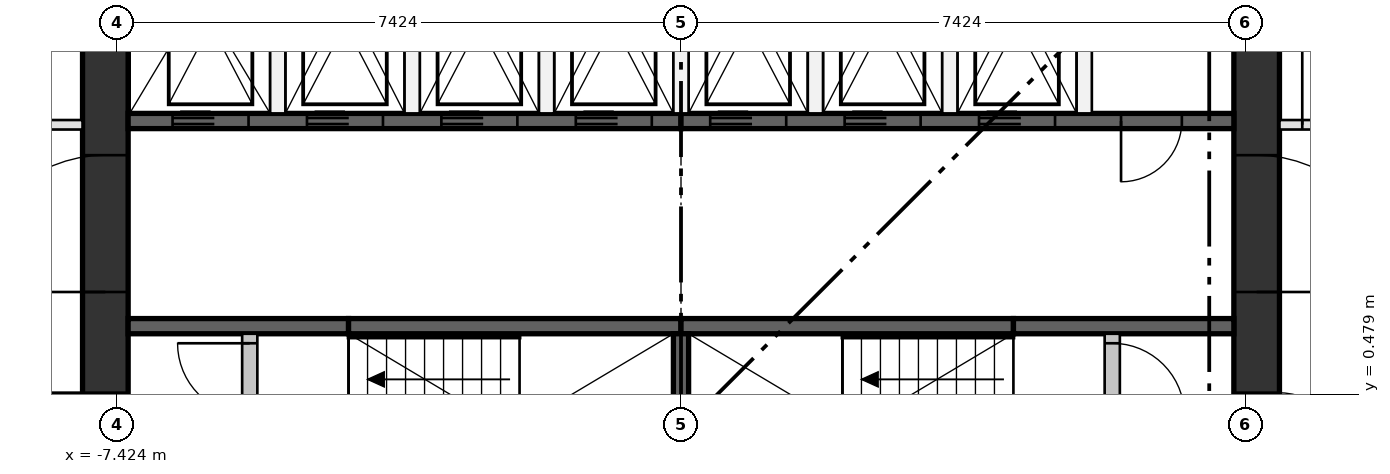
"""IFC4 building model, lengths in metres.
Left out: names, types, materials, properties, quantities, classifications, styles, units other than length and angle.
Written with IfcOpenShell. Run it as: python <this file> out.ifc"""

import sys

from ifc_helpers import new_model, si_unit, direction, frame, frame_2d, origin, place, context, subcontext, project, spatial, rectangle, extrude, element, fill, save


model = new_model("IFC4")
c1 = context("Model", 3, precision=1e-05, world=origin(), true_north=direction((0.0, 1.0)))
c2 = subcontext(c1, "Body", "Model", "MODEL_VIEW")
j1 = project(units=[si_unit("LENGTHUNIT", "METRE"), si_unit("PLANEANGLEUNIT", "RADIAN")], contexts=[c1])
p1 = place(None, origin())
s1 = spatial("IfcSite", under=j1, at=p1, CompositionType="ELEMENT")
p2 = place(p1, origin())
s2 = spatial("IfcBuilding", under=s1, at=p2, CompositionType="ELEMENT")
p3 = place(p2, frame((0.0, 0.0, 144.4)))
s3 = spatial("IfcBuildingStorey", under=s2, at=p3, CompositionType="ELEMENT", Elevation=144.4)
p4 = place(p3, frame((-7.574, -7.274, 0.0), z_axis=(0.0, 0.0, 1.0), x_axis=(0.0, 1.0, 0.0)))
e1 = element("IfcWall", 1, at=p4, inside=s3, PredefinedType="SHEAR", context=c2, shape_type="SweptSolid", body=[
    extrude(rectangle(XDim=14.548, YDim=0.6, at=frame_2d((7.274, 0.0))), origin(), (0.0, 0.0, 1.0), 3.35),
])
p5 = place(p4, frame((6.774, 0.0, 0.0)))
e2 = element("IfcOpeningElement", 2, at=p5, cuts=e1, PredefinedType="OPENING", context=c2, shape_type="SweptSolid", body=[
    extrude(rectangle(XDim=1.0, YDim=2.1, at=frame_2d((0.5, 1.05))), frame((0.0, 0.31, 0.0), z_axis=(0.0, -1.0, 0.0), x_axis=(1.0, 0.0, 0.0)), (0.0, 0.0, 1.0), 0.62),
])
p6 = place(p4, frame((3.649, 0.0, 0.0)))
e3 = element("IfcOpeningElement", 3, at=p6, cuts=e1, PredefinedType="OPENING", context=c2, shape_type="SweptSolid", body=[
    extrude(rectangle(XDim=1.8, YDim=2.1, at=frame_2d((0.9, 1.05))), frame((0.0, 0.31, 0.0), z_axis=(0.0, -1.0, 0.0), x_axis=(1.0, 0.0, 0.0)), (0.0, 0.0, 1.0), 0.62),
])
p7 = place(p4, frame((9.098, 0.0, 0.0)))
e4 = element("IfcOpeningElement", 4, at=p7, cuts=e1, PredefinedType="OPENING", context=c2, shape_type="SweptSolid", body=[
    extrude(rectangle(XDim=1.8, YDim=2.1, at=frame_2d((0.9, 1.05))), frame((0.0, 0.31, 0.0), z_axis=(0.0, -1.0, 0.0), x_axis=(1.0, 0.0, 0.0)), (0.0, 0.0, 1.0), 0.62),
])
p8 = place(p3, frame((7.574, -7.274, 0.0), z_axis=(0.0, 0.0, 1.0), x_axis=(0.0, 1.0, 0.0)))
e5 = element("IfcWall", 5, at=p8, inside=s3, PredefinedType="SHEAR", context=c2, shape_type="SweptSolid", body=[
    extrude(rectangle(XDim=14.548, YDim=0.6, at=frame_2d((7.274, 0.0))), origin(), (0.0, 0.0, 1.0), 3.35),
])
p9 = place(p8, frame((6.774, 0.0, 0.0)))
e6 = element("IfcOpeningElement", 6, at=p9, cuts=e5, PredefinedType="OPENING", context=c2, shape_type="SweptSolid", body=[
    extrude(rectangle(XDim=1.0, YDim=2.1, at=frame_2d((0.5, 1.05))), frame((0.0, 0.31, 0.0), z_axis=(0.0, -1.0, 0.0), x_axis=(1.0, 0.0, 0.0)), (0.0, 0.0, 1.0), 0.62),
])
p10 = place(p8, frame((3.649, 0.0, 0.0)))
e7 = element("IfcOpeningElement", 7, at=p10, cuts=e5, PredefinedType="OPENING", context=c2, shape_type="SweptSolid", body=[
    extrude(rectangle(XDim=1.8, YDim=2.1, at=frame_2d((0.9, 1.05))), frame((0.0, 0.31, 0.0), z_axis=(0.0, -1.0, 0.0), x_axis=(1.0, 0.0, 0.0)), (0.0, 0.0, 1.0), 0.62),
])
p11 = place(p8, frame((9.098, 0.0, 0.0)))
e8 = element("IfcOpeningElement", 8, at=p11, cuts=e5, PredefinedType="OPENING", context=c2, shape_type="SweptSolid", body=[
    extrude(rectangle(XDim=1.8, YDim=2.1, at=frame_2d((0.9, 1.05))), frame((0.0, 0.31, 0.0), z_axis=(0.0, -1.0, 0.0), x_axis=(1.0, 0.0, 0.0)), (0.0, 0.0, 1.0), 0.62),
])
p12 = place(p3, frame((-7.274, 4.074, 0.0), z_axis=(0.0, 0.0, 1.0), x_axis=(1.0, 0.0, 0.0)))
e9 = element("IfcWall", 9, at=p12, inside=s3, PredefinedType="SHEAR", context=c2, shape_type="SweptSolid", body=[
    extrude(rectangle(XDim=7.274, YDim=0.2, at=frame_2d((3.637, 0.0))), origin(), (0.0, 0.0, 1.0), 3.0),
])
p13 = place(p12, frame((0.584, 0.0, 0.0)))
e10 = element("IfcOpeningElement", 10, at=p13, cuts=e9, PredefinedType="OPENING", context=c2, shape_type="SweptSolid", body=[
    extrude(rectangle(XDim=1.0, YDim=2.1, at=frame_2d((0.5, 1.05))), frame((0.0, 0.11, 0.0), z_axis=(0.0, -1.0, 0.0), x_axis=(1.0, 0.0, 0.0)), (0.0, 0.0, 1.0), 0.22),
])
p14 = place(p12, frame((2.353, 0.0, 0.0)))
e11 = element("IfcOpeningElement", 11, at=p14, cuts=e9, PredefinedType="OPENING", context=c2, shape_type="SweptSolid", body=[
    extrude(rectangle(XDim=1.0, YDim=2.1, at=frame_2d((0.5, 1.05))), frame((0.0, 0.11, 0.0), z_axis=(0.0, -1.0, 0.0), x_axis=(1.0, 0.0, 0.0)), (0.0, 0.0, 1.0), 0.22),
])
p15 = place(p12, frame((4.121, 0.0, 0.0)))
e12 = element("IfcOpeningElement", 12, at=p15, cuts=e9, PredefinedType="OPENING", context=c2, shape_type="SweptSolid", body=[
    extrude(rectangle(XDim=1.0, YDim=2.1, at=frame_2d((0.5, 1.05))), frame((0.0, 0.11, 0.0), z_axis=(0.0, -1.0, 0.0), x_axis=(1.0, 0.0, 0.0)), (0.0, 0.0, 1.0), 0.22),
])
p16 = place(p12, frame((5.89, 0.0, 0.0)))
e13 = element("IfcOpeningElement", 13, at=p16, cuts=e9, PredefinedType="OPENING", context=c2, shape_type="SweptSolid", body=[
    extrude(rectangle(XDim=1.0, YDim=2.1, at=frame_2d((0.5, 1.05))), frame((0.0, 0.11, 0.0), z_axis=(0.0, -1.0, 0.0), x_axis=(1.0, 0.0, 0.0)), (0.0, 0.0, 1.0), 0.22),
])
p17 = place(p3, frame((0.0, 4.074, 0.0), z_axis=(0.0, 0.0, 1.0), x_axis=(1.0, 0.0, 0.0)))
e14 = element("IfcWall", 14, at=p17, inside=s3, PredefinedType="SHEAR", context=c2, shape_type="SweptSolid", body=[
    extrude(rectangle(XDim=7.274, YDim=0.2, at=frame_2d((3.637, 0.0))), origin(), (0.0, 0.0, 1.0), 3.0),
])
p18 = place(p17, frame((0.384, 0.0, 0.0)))
e15 = element("IfcOpeningElement", 15, at=p18, cuts=e14, PredefinedType="OPENING", context=c2, shape_type="SweptSolid", body=[
    extrude(rectangle(XDim=1.0, YDim=2.1, at=frame_2d((0.5, 1.05))), frame((0.0, 0.11, 0.0), z_axis=(0.0, -1.0, 0.0), x_axis=(1.0, 0.0, 0.0)), (0.0, 0.0, 1.0), 0.22),
])
p19 = place(p17, frame((2.153, 0.0, 0.0)))
e16 = element("IfcOpeningElement", 16, at=p19, cuts=e14, PredefinedType="OPENING", context=c2, shape_type="SweptSolid", body=[
    extrude(rectangle(XDim=1.0, YDim=2.1, at=frame_2d((0.5, 1.05))), frame((0.0, 0.11, 0.0), z_axis=(0.0, -1.0, 0.0), x_axis=(1.0, 0.0, 0.0)), (0.0, 0.0, 1.0), 0.22),
])
p20 = place(p17, frame((3.921, 0.0, 0.0)))
e17 = element("IfcOpeningElement", 17, at=p20, cuts=e14, PredefinedType="OPENING", context=c2, shape_type="SweptSolid", body=[
    extrude(rectangle(XDim=1.0, YDim=2.1, at=frame_2d((0.5, 1.05))), frame((0.0, 0.11, 0.0), z_axis=(0.0, -1.0, 0.0), x_axis=(1.0, 0.0, 0.0)), (0.0, 0.0, 1.0), 0.22),
])
p21 = place(p17, frame((5.79, 0.0, 0.0)))
e18 = element("IfcOpeningElement", 18, at=p21, cuts=e14, PredefinedType="OPENING", context=c2, shape_type="SweptSolid", body=[
    extrude(rectangle(XDim=0.8, YDim=2.1, at=frame_2d((0.4, 1.05))), frame((0.0, 0.11, 0.0), z_axis=(0.0, -1.0, 0.0), x_axis=(1.0, 0.0, 0.0)), (0.0, 0.0, 1.0), 0.22),
])
p22 = place(p3, frame((-7.274, 1.375, 0.0), z_axis=(0.0, 0.0, 1.0), x_axis=(1.0, 0.0, 0.0)))
e19 = element("IfcWall", 19, at=p22, inside=s3, PredefinedType="SHEAR", context=c2, shape_type="SweptSolid", body=[
    extrude(rectangle(XDim=2.9, YDim=0.2, at=frame_2d((1.45, 0.0))), origin(), (0.0, 0.0, 1.0), 3.0),
])
for number, where, z_axis, x_axis in (
    (20, (-4.374, 1.375, 0.0), (0.0, 0.0, 1.0), (1.0, 0.0, 0.0)),
    (21, (0.0, 1.375, 0.0), (0.0, 0.0, 1.0), (1.0, 0.0, 0.0)),
):
    element("IfcWall", number, at=place(p3, frame(where, z_axis=z_axis, x_axis=x_axis)), inside=s3, PredefinedType="SHEAR", context=c2, shape_type="SweptSolid", body=[
        extrude(rectangle(XDim=4.374, YDim=0.2, at=frame_2d((2.187, 0.0))), origin(), (0.0, 0.0, 1.0), 3.0),
    ])
p23 = place(p3, frame((4.374, 1.375, 0.0), z_axis=(0.0, 0.0, 1.0), x_axis=(1.0, 0.0, 0.0)))
e22 = element("IfcWall", 22, at=p23, inside=s3, PredefinedType="SHEAR", context=c2, shape_type="SweptSolid", body=[
    extrude(rectangle(XDim=2.9, YDim=0.2, at=frame_2d((1.45, 0.0))), origin(), (0.0, 0.0, 1.0), 3.0),
])
p24 = place(p3, frame((0.0, -1.275, 0.0), z_axis=(0.0, 0.0, 1.0), x_axis=(0.0, 1.0, 0.0)))
e23 = element("IfcWall", 23, at=p24, inside=s3, PredefinedType="SHEAR", context=c2, shape_type="SweptSolid", body=[
    extrude(rectangle(XDim=2.55, YDim=0.2, at=frame_2d((1.275, 0.0))), origin(), (0.0, 0.0, 1.0), 3.0),
])
for number, where, z_axis, x_axis in (
    (24, (-5.305, 4.174, 0.0), (0.0, 0.0, 1.0), (0.0, 1.0, 0.0)),
    (25, (-3.537, 4.174, 0.0), (0.0, 0.0, 1.0), (0.0, 1.0, 0.0)),
    (26, (-1.769, 4.174, 0.0), (0.0, 0.0, 1.0), (0.0, 1.0, 0.0)),
    (27, (0.0, 4.174, 0.0), (0.0, 0.0, 1.0), (0.0, 1.0, 0.0)),
    (28, (1.769, 4.174, 0.0), (0.0, 0.0, 1.0), (0.0, 1.0, 0.0)),
    (29, (3.537, 4.174, 0.0), (0.0, 0.0, 1.0), (0.0, 1.0, 0.0)),
    (30, (5.305, 4.174, 0.0), (0.0, 0.0, 1.0), (0.0, 1.0, 0.0)),
):
    element("IfcWall", number, at=place(p3, frame(where, z_axis=z_axis, x_axis=x_axis)), inside=s3, PredefinedType="PARTITIONING", context=c2, shape_type="SweptSolid", body=[
        extrude(rectangle(XDim=3.1, YDim=0.2, at=frame_2d((1.55, 0.0))), origin(), (0.0, 0.0, 1.0), 3.0),
    ])
p25 = place(p3, frame((-5.674, -1.275, 0.0), z_axis=(0.0, 0.0, 1.0), x_axis=(0.0, 1.0, 0.0)))
e31 = element("IfcWall", 31, at=p25, inside=s3, PredefinedType="PARTITIONING", context=c2, shape_type="SweptSolid", body=[
    extrude(rectangle(XDim=2.55, YDim=0.2, at=frame_2d((1.275, 0.0))), origin(), (0.0, 0.0, 1.0), 3.0),
])
p26 = place(p25, frame((0.125, 0.0, 0.0)))
e32 = element("IfcOpeningElement", 32, at=p26, cuts=e31, PredefinedType="OPENING", context=c2, shape_type="SweptSolid", body=[
    extrude(rectangle(XDim=0.95, YDim=2.1, at=frame_2d((0.475, 1.05))), frame((0.0, 0.11, 0.0), z_axis=(0.0, -1.0, 0.0), x_axis=(1.0, 0.0, 0.0)), (0.0, 0.0, 1.0), 0.22),
])
p27 = place(p25, frame((1.475, 0.0, 0.0)))
e33 = element("IfcOpeningElement", 33, at=p27, cuts=e31, PredefinedType="OPENING", context=c2, shape_type="SweptSolid", body=[
    extrude(rectangle(XDim=0.95, YDim=2.1, at=frame_2d((0.475, 1.05))), frame((0.0, 0.11, 0.0), z_axis=(0.0, -1.0, 0.0), x_axis=(1.0, 0.0, 0.0)), (0.0, 0.0, 1.0), 0.22),
])
p28 = place(p3, frame((5.674, -1.275, 0.0), z_axis=(0.0, 0.0, 1.0), x_axis=(0.0, 1.0, 0.0)))
e34 = element("IfcWall", 34, at=p28, inside=s3, PredefinedType="PARTITIONING", context=c2, shape_type="SweptSolid", body=[
    extrude(rectangle(XDim=2.55, YDim=0.2, at=frame_2d((1.275, 0.0))), origin(), (0.0, 0.0, 1.0), 3.0),
])
p29 = place(p28, frame((0.125, 0.0, 0.0)))
e35 = element("IfcOpeningElement", 35, at=p29, cuts=e34, PredefinedType="OPENING", context=c2, shape_type="SweptSolid", body=[
    extrude(rectangle(XDim=0.95, YDim=2.1, at=frame_2d((0.475, 1.05))), frame((0.0, 0.11, 0.0), z_axis=(0.0, -1.0, 0.0), x_axis=(1.0, 0.0, 0.0)), (0.0, 0.0, 1.0), 0.22),
])
p30 = place(p28, frame((1.475, 0.0, 0.0)))
e36 = element("IfcOpeningElement", 36, at=p30, cuts=e34, PredefinedType="OPENING", context=c2, shape_type="SweptSolid", body=[
    extrude(rectangle(XDim=0.95, YDim=2.1, at=frame_2d((0.475, 1.05))), frame((0.0, 0.11, 0.0), z_axis=(0.0, -1.0, 0.0), x_axis=(1.0, 0.0, 0.0)), (0.0, 0.0, 1.0), 0.22),
])
p31 = place(p3, frame((7.874, 4.024, 0.0), z_axis=(0.0, 0.0, 1.0), x_axis=(1.0, 0.0, 0.0)))
e37 = element("IfcWall", 37, at=p31, inside=s3, PredefinedType="PARTITIONING", context=c2, shape_type="SweptSolid", body=[
    extrude(rectangle(XDim=3.529, YDim=0.125, at=frame_2d((1.764, 0.0))), origin(), (0.0, 0.0, 1.0), 3.0),
])
p32 = place(p31, frame((0.3, 0.0, 0.0)))
e38 = element("IfcOpeningElement", 38, at=p32, cuts=e37, PredefinedType="OPENING", context=c2, shape_type="SweptSolid", body=[
    extrude(rectangle(XDim=1.8, YDim=2.1, at=frame_2d((0.9, 1.05))), frame((0.0, 0.073, 0.0), z_axis=(0.0, -1.0, 0.0), x_axis=(1.0, 0.0, 0.0)), (0.0, 0.0, 1.0), 0.145),
])
p33 = place(p3, frame((-11.508, 4.024, 0.0), z_axis=(0.0, 0.0, 1.0), x_axis=(1.0, 0.0, 0.0)))
e39 = element("IfcWall", 39, at=p33, inside=s3, PredefinedType="PARTITIONING", context=c2, shape_type="SweptSolid", body=[
    extrude(rectangle(XDim=3.634, YDim=0.125, at=frame_2d((1.817, 0.0))), origin(), (0.0, 0.0, 1.0), 3.0),
])
p34 = place(p33, frame((1.3, 0.0, 0.0)))
e40 = element("IfcOpeningElement", 40, at=p34, cuts=e39, PredefinedType="OPENING", context=c2, shape_type="SweptSolid", body=[
    extrude(rectangle(XDim=1.0, YDim=2.1, at=frame_2d((0.5, 1.05))), frame((0.0, 0.073, 0.0), z_axis=(0.0, -1.0, 0.0), x_axis=(1.0, 0.0, 0.0)), (0.0, 0.0, 1.0), 0.145),
])
p35 = place(p13, frame((1.0, 0.0, 0.0), z_axis=(0.0, 0.0, 1.0), x_axis=(-1.0, 0.0, 0.0)))
e41 = element("IfcDoor", 41, at=p35, inside=s3, OperationType="DOUBLE_DOOR_SLIDING", PredefinedType="DOOR", context=c2, shape_type="SweptSolid", body=[
    extrude(rectangle(XDim=1.0, YDim=2.1, at=frame_2d((0.5, 1.05))), frame((0.0, 0.025, 0.0), z_axis=(0.0, -1.0, 0.0), x_axis=(1.0, 0.0, 0.0)), (0.0, 0.0, 1.0), 0.05),
])
fill(e10, e41)
p36 = place(p14, frame((1.0, 0.0, 0.0), z_axis=(0.0, 0.0, 1.0), x_axis=(-1.0, 0.0, 0.0)))
e42 = element("IfcDoor", 42, at=p36, inside=s3, OperationType="DOUBLE_DOOR_SLIDING", PredefinedType="DOOR", context=c2, shape_type="SweptSolid", body=[
    extrude(rectangle(XDim=1.0, YDim=2.1, at=frame_2d((0.5, 1.05))), frame((0.0, 0.025, 0.0), z_axis=(0.0, -1.0, 0.0), x_axis=(1.0, 0.0, 0.0)), (0.0, 0.0, 1.0), 0.05),
])
fill(e11, e42)
p37 = place(p15, frame((1.0, 0.0, 0.0), z_axis=(0.0, 0.0, 1.0), x_axis=(-1.0, 0.0, 0.0)))
e43 = element("IfcDoor", 43, at=p37, inside=s3, OperationType="DOUBLE_DOOR_SLIDING", PredefinedType="DOOR", context=c2, shape_type="SweptSolid", body=[
    extrude(rectangle(XDim=1.0, YDim=2.1, at=frame_2d((0.5, 1.05))), frame((0.0, 0.025, 0.0), z_axis=(0.0, -1.0, 0.0), x_axis=(1.0, 0.0, 0.0)), (0.0, 0.0, 1.0), 0.05),
])
fill(e12, e43)
p38 = place(p16, frame((1.0, 0.0, 0.0), z_axis=(0.0, 0.0, 1.0), x_axis=(-1.0, 0.0, 0.0)))
e44 = element("IfcDoor", 44, at=p38, inside=s3, OperationType="DOUBLE_DOOR_SLIDING", PredefinedType="DOOR", context=c2, shape_type="SweptSolid", body=[
    extrude(rectangle(XDim=1.0, YDim=2.1, at=frame_2d((0.5, 1.05))), frame((0.0, 0.025, 0.0), z_axis=(0.0, -1.0, 0.0), x_axis=(1.0, 0.0, 0.0)), (0.0, 0.0, 1.0), 0.05),
])
fill(e13, e44)
p39 = place(p18, frame((1.0, 0.0, 0.0), z_axis=(0.0, 0.0, 1.0), x_axis=(-1.0, 0.0, 0.0)))
e45 = element("IfcDoor", 45, at=p39, inside=s3, OperationType="DOUBLE_DOOR_SLIDING", PredefinedType="DOOR", context=c2, shape_type="SweptSolid", body=[
    extrude(rectangle(XDim=1.0, YDim=2.1, at=frame_2d((0.5, 1.05))), frame((0.0, 0.025, 0.0), z_axis=(0.0, -1.0, 0.0), x_axis=(1.0, 0.0, 0.0)), (0.0, 0.0, 1.0), 0.05),
])
fill(e15, e45)
p40 = place(p19, frame((1.0, 0.0, 0.0), z_axis=(0.0, 0.0, 1.0), x_axis=(-1.0, 0.0, 0.0)))
e46 = element("IfcDoor", 46, at=p40, inside=s3, OperationType="DOUBLE_DOOR_SLIDING", PredefinedType="DOOR", context=c2, shape_type="SweptSolid", body=[
    extrude(rectangle(XDim=1.0, YDim=2.1, at=frame_2d((0.5, 1.05))), frame((0.0, 0.025, 0.0), z_axis=(0.0, -1.0, 0.0), x_axis=(1.0, 0.0, 0.0)), (0.0, 0.0, 1.0), 0.05),
])
fill(e16, e46)
p41 = place(p20, frame((1.0, 0.0, 0.0), z_axis=(0.0, 0.0, 1.0), x_axis=(-1.0, 0.0, 0.0)))
e47 = element("IfcDoor", 47, at=p41, inside=s3, OperationType="DOUBLE_DOOR_SLIDING", PredefinedType="DOOR", context=c2, shape_type="SweptSolid", body=[
    extrude(rectangle(XDim=1.0, YDim=2.1, at=frame_2d((0.5, 1.05))), frame((0.0, 0.025, 0.0), z_axis=(0.0, -1.0, 0.0), x_axis=(1.0, 0.0, 0.0)), (0.0, 0.0, 1.0), 0.05),
])
fill(e17, e47)
p42 = place(p27, origin())
e48 = element("IfcDoor", 48, at=p42, inside=s3, OperationType="SINGLE_SWING_RIGHT", PredefinedType="DOOR", context=c2, shape_type="SweptSolid", body=[
    extrude(rectangle(XDim=0.95, YDim=2.1, at=frame_2d((0.475, 1.05))), frame((0.0, 0.025, 0.0), z_axis=(0.0, -1.0, 0.0), x_axis=(1.0, 0.0, 0.0)), (0.0, 0.0, 1.0), 0.05),
])
fill(e33, e48)
p43 = place(p30, frame((0.95, 0.0, 0.0), z_axis=(0.0, 0.0, 1.0), x_axis=(-1.0, 0.0, 0.0)))
e49 = element("IfcDoor", 49, at=p43, inside=s3, OperationType="SINGLE_SWING_LEFT", PredefinedType="DOOR", context=c2, shape_type="SweptSolid", body=[
    extrude(rectangle(XDim=0.95, YDim=2.1, at=frame_2d((0.475, 1.05))), frame((0.0, 0.025, 0.0), z_axis=(0.0, -1.0, 0.0), x_axis=(1.0, 0.0, 0.0)), (0.0, 0.0, 1.0), 0.05),
])
fill(e36, e49)
p44 = place(p21, frame((0.8, 0.0, 0.0), z_axis=(0.0, 0.0, 1.0), x_axis=(-1.0, 0.0, 0.0)))
e50 = element("IfcDoor", 50, at=p44, inside=s3, OperationType="SINGLE_SWING_LEFT", PredefinedType="DOOR", context=c2, shape_type="SweptSolid", body=[
    extrude(rectangle(XDim=0.8, YDim=2.1, at=frame_2d((0.4, 1.05))), frame((0.0, 0.025, 0.0), z_axis=(0.0, -1.0, 0.0), x_axis=(1.0, 0.0, 0.0)), (0.0, 0.0, 1.0), 0.05),
])
fill(e18, e50)
p45 = place(p5, origin())
e51 = element("IfcDoor", 51, at=p45, inside=s3, OperationType="SINGLE_SWING_RIGHT", PredefinedType="DOOR", context=c2, shape_type="SweptSolid", body=[
    extrude(rectangle(XDim=1.0, YDim=2.1, at=frame_2d((0.5, 1.05))), frame((0.0, 0.3, 0.0), z_axis=(0.0, -1.0, 0.0), x_axis=(1.0, 0.0, 0.0)), (0.0, 0.0, 1.0), 0.05),
])
fill(e2, e51)
p46 = place(p7, origin())
e52 = element("IfcDoor", 52, at=p46, inside=s3, OperationType="DOUBLE_DOOR_SINGLE_SWING", PredefinedType="DOOR", context=c2, shape_type="SweptSolid", body=[
    extrude(rectangle(XDim=1.8, YDim=2.1, at=frame_2d((0.9, 1.05))), frame((0.0, 0.025, 0.0), z_axis=(0.0, -1.0, 0.0), x_axis=(1.0, 0.0, 0.0)), (0.0, 0.0, 1.0), 0.05),
])
fill(e4, e52)
p47 = place(p9, frame((1.0, 0.0, 0.0), z_axis=(0.0, 0.0, 1.0), x_axis=(-1.0, 0.0, 0.0)))
e53 = element("IfcDoor", 53, at=p47, inside=s3, OperationType="SINGLE_SWING_LEFT", PredefinedType="DOOR", context=c2, shape_type="SweptSolid", body=[
    extrude(rectangle(XDim=1.0, YDim=2.1, at=frame_2d((0.5, 1.05))), frame((0.0, 0.3, 0.0), z_axis=(0.0, -1.0, 0.0), x_axis=(1.0, 0.0, 0.0)), (0.0, 0.0, 1.0), 0.05),
])
fill(e6, e53)
p48 = place(p11, frame((1.8, 0.0, 0.0), z_axis=(0.0, 0.0, 1.0), x_axis=(-1.0, 0.0, 0.0)))
e54 = element("IfcDoor", 54, at=p48, inside=s3, OperationType="DOUBLE_DOOR_SINGLE_SWING", PredefinedType="DOOR", context=c2, shape_type="SweptSolid", body=[
    extrude(rectangle(XDim=1.8, YDim=2.1, at=frame_2d((0.9, 1.05))), frame((0.0, 0.025, 0.0), z_axis=(0.0, -1.0, 0.0), x_axis=(1.0, 0.0, 0.0)), (0.0, 0.0, 1.0), 0.05),
])
fill(e8, e54)
p49 = place(p32, origin())
e55 = element("IfcDoor", 55, at=p49, inside=s3, OperationType="DOUBLE_DOOR_SINGLE_SWING", PredefinedType="DOOR", context=c2, shape_type="SweptSolid", body=[
    extrude(rectangle(XDim=1.8, YDim=2.1, at=frame_2d((0.9, 1.05))), frame((0.0, 0.025, 0.0), z_axis=(0.0, -1.0, 0.0), x_axis=(1.0, 0.0, 0.0)), (0.0, 0.0, 1.0), 0.05),
])
fill(e38, e55)
save(model, sys.argv[1])
